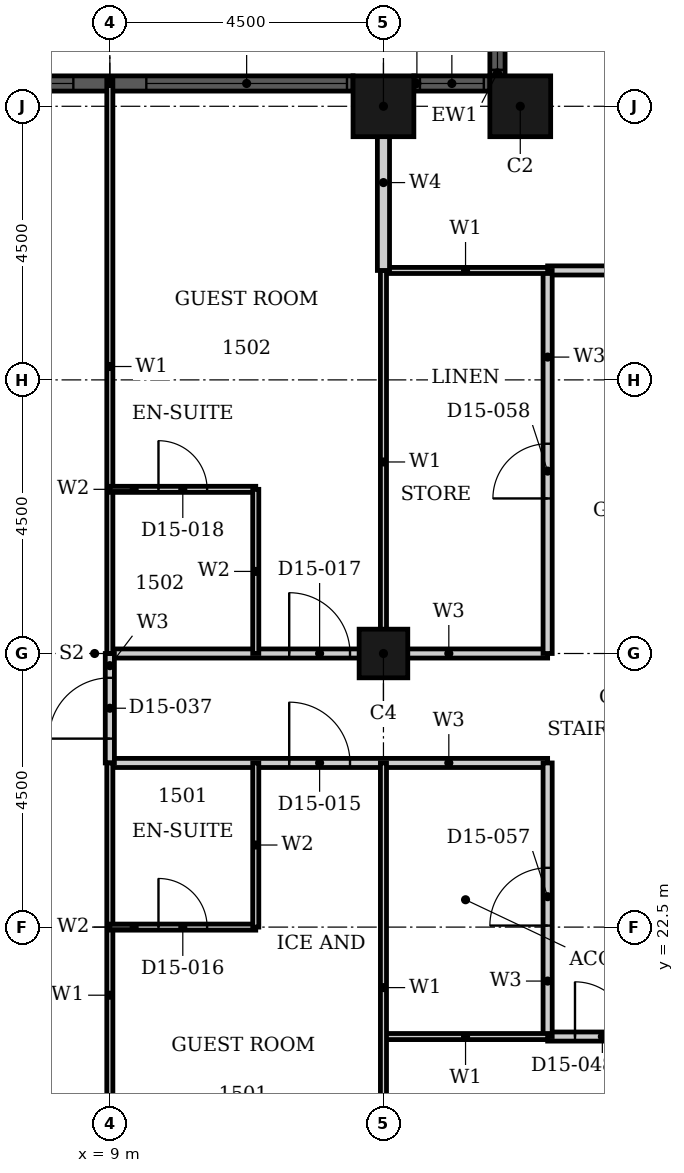
"""IFC4 building model, lengths in metres.
Left out: names, types, materials, properties, quantities, classifications, styles, units other than length and angle.
Written with IfcOpenShell. Run it as: python <this file> out.ifc"""

import sys

from ifc_helpers import new_model, si_unit, direction, frame, frame_2d, origin, origin_2d, place, context, subcontext, project, spatial, rectangle, hollow_rectangle, extrude, element, fill, save


model = new_model("IFC4")
c1 = context("Model", 3, precision=1e-05, world=origin(), true_north=direction((0.0, 1.0)))
c2 = subcontext(c1, "Body", "Model", "MODEL_VIEW")
j1 = project(units=[si_unit("LENGTHUNIT", "METRE"), si_unit("PLANEANGLEUNIT", "RADIAN")], contexts=[c1])
p1 = place(None, origin())
s1 = spatial("IfcSite", under=j1, at=p1, CompositionType="ELEMENT")
p2 = place(p1, origin())
s2 = spatial("IfcBuilding", under=s1, at=p2, CompositionType="ELEMENT")
p3 = place(p2, frame((0.0, 0.0, 67.2)))
s3 = spatial("IfcBuildingStorey", under=s2, at=p3, CompositionType="ELEMENT", Elevation=67.2)
for number, where, z_axis, x_axis in (
    (1, (15.75, 36.0, 0.0), (0.0, 0.0, 1.0), (1.0, 0.0, 0.0)),
    (2, (13.5, 36.0, 0.0), (0.0, 0.0, 1.0), (1.0, 0.0, 0.0)),
):
    element("IfcColumn", number, at=place(p3, frame(where, z_axis=z_axis, x_axis=x_axis)), inside=s3, PredefinedType="COLUMN", context=c2, shape_type="SweptSolid", body=[
        extrude(hollow_rectangle(XDim=1.0, YDim=1.0, WallThickness=0.032, at=origin_2d()), origin(), (0.0, 0.0, 1.0), 3.6),
    ])
p4 = place(p3, frame((13.5, 27.0, 0.0), z_axis=(0.0, 0.0, 1.0), x_axis=(1.0, 0.0, 0.0)))
e3 = element("IfcColumn", 3, at=p4, inside=s3, PredefinedType="COLUMN", context=c2, shape_type="SweptSolid", body=[
    extrude(hollow_rectangle(XDim=0.8, YDim=0.8, WallThickness=0.025, at=origin_2d()), origin(), (0.0, 0.0, 1.0), 3.6),
])
p5 = place(p3, frame((15.375, 37.75, 0.0), z_axis=(0.0, 0.0, 1.0), x_axis=(0.0, -1.0, 0.0)))
e4 = element("IfcWall", 4, at=p5, inside=s3, PredefinedType="SOLIDWALL", context=c2, shape_type="SweptSolid", body=[
    extrude(rectangle(XDim=1.25, YDim=0.25, at=frame_2d((0.625, 0.0))), origin(), (0.0, 0.0, 1.0), 3.6),
])
p6 = place(p5, frame((0.1, 0.0, 0.9)))
e5 = element("IfcOpeningElement", 5, at=p6, cuts=e4, PredefinedType="OPENING", context=c2, shape_type="SweptSolid", body=[
    extrude(rectangle(XDim=1.05, YDim=2.08, at=frame_2d((0.525, 1.04))), frame((0.0, 0.135, 0.0), z_axis=(0.0, -1.0, 0.0), x_axis=(1.0, 0.0, 0.0)), (0.0, 0.0, 1.0), 0.27),
])
p7 = place(p3, frame((15.25, 36.375, 0.0), z_axis=(0.0, 0.0, 1.0), x_axis=(-1.0, 0.0, 0.0)))
e6 = element("IfcWall", 6, at=p7, inside=s3, PredefinedType="SOLIDWALL", context=c2, shape_type="SweptSolid", body=[
    extrude(rectangle(XDim=1.25, YDim=0.25, at=frame_2d((0.625, 0.0))), origin(), (0.0, 0.0, 1.0), 3.6),
])
p8 = place(p7, frame((0.1, 0.0, 0.9)))
e7 = element("IfcOpeningElement", 7, at=p8, cuts=e6, PredefinedType="OPENING", context=c2, shape_type="SweptSolid", body=[
    extrude(rectangle(XDim=1.05, YDim=2.08, at=frame_2d((0.525, 1.04))), frame((0.0, 0.135, 0.0), z_axis=(0.0, -1.0, 0.0), x_axis=(1.0, 0.0, 0.0)), (0.0, 0.0, 1.0), 0.27),
])
p9 = place(p3, frame((13.0, 36.375, 0.0), z_axis=(0.0, 0.0, 1.0), x_axis=(-1.0, 0.0, 0.0)))
e8 = element("IfcWall", 8, at=p9, inside=s3, PredefinedType="SOLIDWALL", context=c2, shape_type="SweptSolid", body=[
    extrude(rectangle(XDim=8.0, YDim=0.25, at=frame_2d((4.0, 0.0))), origin(), (0.0, 0.0, 1.0), 3.6),
])
p10 = place(p9, frame((0.1, 0.0, 0.9)))
e9 = element("IfcOpeningElement", 9, at=p10, cuts=e8, PredefinedType="OPENING", context=c2, shape_type="SweptSolid", body=[
    extrude(rectangle(XDim=3.3, YDim=2.08, at=frame_2d((1.65, 1.04))), frame((0.0, 0.135, 0.0), z_axis=(0.0, -1.0, 0.0), x_axis=(1.0, 0.0, 0.0)), (0.0, 0.0, 1.0), 0.27),
])
p11 = place(p9, frame((4.6, 0.0, 0.9)))
e10 = element("IfcOpeningElement", 10, at=p11, cuts=e8, PredefinedType="OPENING", context=c2, shape_type="SweptSolid", body=[
    extrude(rectangle(XDim=3.3, YDim=2.08, at=frame_2d((1.65, 1.04))), frame((0.0, 0.135, 0.0), z_axis=(0.0, -1.0, 0.0), x_axis=(1.0, 0.0, 0.0)), (0.0, 0.0, 1.0), 0.27),
])
p12 = place(p3, frame((16.2, 20.7, 0.0), z_axis=(0.0, 0.0, 1.0), x_axis=(1.0, 0.0, 0.0)))
e11 = element("IfcWall", 11, at=p12, inside=s3, PredefinedType="PARTITIONING", context=c2, shape_type="SweptSolid", body=[
    extrude(rectangle(XDim=13.5, YDim=0.15, at=frame_2d((6.75, 0.0))), origin(), (0.0, 0.0, 1.0), 3.3),
])
p13 = place(p12, frame((4.75, 0.0, 0.0)))
e12 = element("IfcOpeningElement", 12, at=p13, cuts=e11, PredefinedType="OPENING", context=c2, shape_type="SweptSolid", body=[
    extrude(rectangle(XDim=1.0, YDim=2.1, at=frame_2d((0.5, 1.05))), frame((0.0, 0.085, 0.0), z_axis=(0.0, -1.0, 0.0), x_axis=(1.0, 0.0, 0.0)), (0.0, 0.0, 1.0), 0.17),
])
p14 = place(p12, frame((0.45, 0.0, 0.0)))
e13 = element("IfcOpeningElement", 13, at=p14, cuts=e11, PredefinedType="OPENING", context=c2, shape_type="SweptSolid", body=[
    extrude(rectangle(XDim=0.9, YDim=2.1, at=frame_2d((0.45, 1.05))), frame((0.0, 0.085, 0.0), z_axis=(0.0, -1.0, 0.0), x_axis=(1.0, 0.0, 0.0)), (0.0, 0.0, 1.0), 0.17),
])
p15 = place(p12, frame((7.35, 0.0, 0.0)))
e14 = element("IfcOpeningElement", 14, at=p15, cuts=e11, PredefinedType="OPENING", context=c2, shape_type="SweptSolid", body=[
    extrude(rectangle(XDim=0.9, YDim=2.1, at=frame_2d((0.45, 1.05))), frame((0.0, 0.085, 0.0), z_axis=(0.0, -1.0, 0.0), x_axis=(1.0, 0.0, 0.0)), (0.0, 0.0, 1.0), 0.17),
])
p16 = place(p12, frame((10.95, 0.0, 0.0)))
e15 = element("IfcOpeningElement", 15, at=p16, cuts=e11, PredefinedType="OPENING", context=c2, shape_type="SweptSolid", body=[
    extrude(rectangle(XDim=0.9, YDim=2.1, at=frame_2d((0.45, 1.05))), frame((0.0, 0.085, 0.0), z_axis=(0.0, -1.0, 0.0), x_axis=(1.0, 0.0, 0.0)), (0.0, 0.0, 1.0), 0.17),
])
p17 = place(p3, frame((9.0, 25.2, 0.0), z_axis=(0.0, 0.0, 1.0), x_axis=(1.0, 0.0, 0.0)))
e16 = element("IfcWall", 16, at=p17, inside=s3, PredefinedType="PARTITIONING", context=c2, shape_type="SweptSolid", body=[
    extrude(rectangle(XDim=7.2, YDim=0.15, at=frame_2d((3.6, 0.0))), origin(), (0.0, 0.0, 1.0), 3.3),
])
p18 = place(p17, frame((2.95, 0.0, 0.0)))
e17 = element("IfcOpeningElement", 17, at=p18, cuts=e16, PredefinedType="OPENING", context=c2, shape_type="SweptSolid", body=[
    extrude(rectangle(XDim=1.0, YDim=2.1, at=frame_2d((0.5, 1.05))), frame((0.0, 0.085, 0.0), z_axis=(0.0, -1.0, 0.0), x_axis=(1.0, 0.0, 0.0)), (0.0, 0.0, 1.0), 0.17),
])
p19 = place(p3, frame((9.0, 27.0, 0.0), z_axis=(0.0, 0.0, 1.0), x_axis=(1.0, 0.0, 0.0)))
e18 = element("IfcWall", 18, at=p19, inside=s3, PredefinedType="PARTITIONING", context=c2, shape_type="SweptSolid", body=[
    extrude(rectangle(XDim=7.2, YDim=0.15, at=frame_2d((3.6, 0.0))), origin(), (0.0, 0.0, 1.0), 2.58),
])
p20 = place(p19, frame((2.95, 0.0, 0.0)))
e19 = element("IfcOpeningElement", 19, at=p20, cuts=e18, PredefinedType="OPENING", context=c2, shape_type="SweptSolid", body=[
    extrude(rectangle(XDim=1.0, YDim=2.1, at=frame_2d((0.5, 1.05))), frame((0.0, 0.085, 0.0), z_axis=(0.0, -1.0, 0.0), x_axis=(1.0, 0.0, 0.0)), (0.0, 0.0, 1.0), 0.17),
])
p21 = place(p3, frame((16.2, 33.3, 0.0), z_axis=(0.0, 0.0, 1.0), x_axis=(1.0, 0.0, 0.0)))
e20 = element("IfcWall", 20, at=p21, inside=s3, PredefinedType="PARTITIONING", context=c2, shape_type="SweptSolid", body=[
    extrude(rectangle(XDim=9.9, YDim=0.15, at=frame_2d((4.95, 0.0))), origin(), (0.0, 0.0, 1.0), 3.3),
])
p22 = place(p21, frame((4.75, 0.0, 0.0)))
e21 = element("IfcOpeningElement", 21, at=p22, cuts=e20, PredefinedType="OPENING", context=c2, shape_type="SweptSolid", body=[
    extrude(rectangle(XDim=1.0, YDim=2.1, at=frame_2d((0.5, 1.05))), frame((0.0, 0.085, 0.0), z_axis=(0.0, -1.0, 0.0), x_axis=(1.0, 0.0, 0.0)), (0.0, 0.0, 1.0), 0.17),
])
p23 = place(p21, frame((7.65, 0.0, 0.0)))
e22 = element("IfcOpeningElement", 22, at=p23, cuts=e20, PredefinedType="OPENING", context=c2, shape_type="SweptSolid", body=[
    extrude(rectangle(XDim=0.9, YDim=2.1, at=frame_2d((0.45, 1.05))), frame((0.0, 0.085, 0.0), z_axis=(0.0, -1.0, 0.0), x_axis=(1.0, 0.0, 0.0)), (0.0, 0.0, 1.0), 0.17),
])
p24 = place(p3, frame((16.2, 27.0, 0.0), z_axis=(0.0, 0.0, 1.0), x_axis=(0.0, 1.0, 0.0)))
e23 = element("IfcWall", 23, at=p24, inside=s3, PredefinedType="PARTITIONING", context=c2, shape_type="SweptSolid", body=[
    extrude(rectangle(XDim=6.3, YDim=0.15, at=frame_2d((3.15, 0.0))), origin(), (0.0, 0.0, 1.0), 3.3),
])
p25 = place(p24, frame((2.55, 0.0, 0.0)))
e24 = element("IfcOpeningElement", 24, at=p25, cuts=e23, PredefinedType="OPENING", context=c2, shape_type="SweptSolid", body=[
    extrude(rectangle(XDim=0.9, YDim=2.1, at=frame_2d((0.45, 1.05))), frame((0.0, 0.085, 0.0), z_axis=(0.0, -1.0, 0.0), x_axis=(1.0, 0.0, 0.0)), (0.0, 0.0, 1.0), 0.17),
])
p26 = place(p3, frame((16.2, 20.7, 0.0), z_axis=(0.0, 0.0, 1.0), x_axis=(0.0, 1.0, 0.0)))
e25 = element("IfcWall", 25, at=p26, inside=s3, PredefinedType="PARTITIONING", context=c2, shape_type="SweptSolid", body=[
    extrude(rectangle(XDim=4.5, YDim=0.15, at=frame_2d((2.25, 0.0))), origin(), (0.0, 0.0, 1.0), 3.3),
])
p27 = place(p26, frame((1.825, 0.0, 0.0)))
e26 = element("IfcOpeningElement", 26, at=p27, cuts=e25, PredefinedType="OPENING", context=c2, shape_type="SweptSolid", body=[
    extrude(rectangle(XDim=0.95, YDim=2.1, at=frame_2d((0.475, 1.05))), frame((0.0, 0.085, 0.0), z_axis=(0.0, -1.0, 0.0), x_axis=(1.0, 0.0, 0.0)), (0.0, 0.0, 1.0), 0.17),
])
p28 = place(p3, frame((9.0, 25.2, 0.0), z_axis=(0.0, 0.0, 1.0), x_axis=(0.0, 1.0, 0.0)))
e27 = element("IfcWall", 27, at=p28, inside=s3, PredefinedType="PARTITIONING", context=c2, shape_type="SweptSolid", body=[
    extrude(rectangle(XDim=1.8, YDim=0.15, at=frame_2d((0.9, 0.0))), origin(), (0.0, 0.0, 1.0), 3.3),
])
p29 = place(p28, frame((0.4, 0.0, 0.0)))
e28 = element("IfcOpeningElement", 28, at=p29, cuts=e27, PredefinedType="OPENING", context=c2, shape_type="SweptSolid", body=[
    extrude(rectangle(XDim=1.0, YDim=2.1, at=frame_2d((0.5, 1.05))), frame((0.0, 0.085, 0.0), z_axis=(0.0, -1.0, 0.0), x_axis=(1.0, 0.0, 0.0)), (0.0, 0.0, 1.0), 0.17),
])
for number, where, z_axis, x_axis in (
    (29, (13.5, 20.7, 0.0), (0.0, 0.0, 1.0), (1.0, 0.0, 0.0)),
    (30, (13.5, 33.3, 0.0), (0.0, 0.0, 1.0), (1.0, 0.0, 0.0)),
):
    element("IfcWall", number, at=place(p3, frame(where, z_axis=z_axis, x_axis=x_axis)), inside=s3, PredefinedType="PARTITIONING", context=c2, shape_type="SweptSolid", body=[
        extrude(rectangle(XDim=2.7, YDim=0.1, at=frame_2d((1.35, 0.0))), origin(), (0.0, 0.0, 1.0), 3.3),
    ])
p30 = place(p3, frame((13.5, 27.0, 0.0), z_axis=(0.0, 0.0, 1.0), x_axis=(0.0, 1.0, 0.0)))
e31 = element("IfcWall", 31, at=p30, inside=s3, PredefinedType="PARTITIONING", context=c2, shape_type="SweptSolid", body=[
    extrude(rectangle(XDim=6.3, YDim=0.1, at=frame_2d((3.15, 0.0))), origin(), (0.0, 0.0, 1.0), 2.38),
])
p31 = place(p3, frame((13.5, 17.81, 0.0), z_axis=(0.0, 0.0, 1.0), x_axis=(0.0, 1.0, 0.0)))
e32 = element("IfcWall", 32, at=p31, inside=s3, PredefinedType="PARTITIONING", context=c2, shape_type="SweptSolid", body=[
    extrude(rectangle(XDim=7.39, YDim=0.1, at=frame_2d((3.695, 0.0))), origin(), (0.0, 0.0, 1.0), 2.38),
])
p32 = place(p3, frame((9.0, 27.0, 0.0), z_axis=(0.0, 0.0, 1.0), x_axis=(0.0, 1.0, 0.0)))
e33 = element("IfcWall", 33, at=p32, inside=s3, PredefinedType="PARTITIONING", context=c2, shape_type="SweptSolid", body=[
    extrude(rectangle(XDim=9.44, YDim=0.1, at=frame_2d((4.72, 0.0))), origin(), (0.0, 0.0, 1.0), 3.3),
])
p33 = place(p3, frame((9.0, 17.56, 0.0), z_axis=(0.0, 0.0, 1.0), x_axis=(0.0, 1.0, 0.0)))
e34 = element("IfcWall", 34, at=p33, inside=s3, PredefinedType="PARTITIONING", context=c2, shape_type="SweptSolid", body=[
    extrude(rectangle(XDim=7.64, YDim=0.1, at=frame_2d((3.82, 0.0))), origin(), (0.0, 0.0, 1.0), 3.3),
])
p34 = place(p3, frame((13.5, 33.3, 0.0), z_axis=(0.0, 0.0, 1.0), x_axis=(0.0, 1.0, 0.0)))
e35 = element("IfcWall", 35, at=p34, inside=s3, PredefinedType="PARTITIONING", context=c2, shape_type="SweptSolid", body=[
    extrude(rectangle(XDim=2.89, YDim=0.2, at=frame_2d((1.445, 0.0))), origin(), (0.0, 0.0, 1.0), 2.38),
])
p35 = place(p3, frame((9.0, 22.5, 0.0), z_axis=(0.0, 0.0, 1.0), x_axis=(1.0, 0.0, 0.0)))
e36 = element("IfcWall", 36, at=p35, inside=s3, PredefinedType="PARTITIONING", context=c2, shape_type="SweptSolid", body=[
    extrude(rectangle(XDim=2.4, YDim=0.1, at=frame_2d((1.2, 0.0))), origin(), (0.0, 0.0, 1.0), 2.58),
])
p36 = place(p35, frame((0.8, 0.0, 0.0)))
e37 = element("IfcOpeningElement", 37, at=p36, cuts=e36, PredefinedType="OPENING", context=c2, shape_type="SweptSolid", body=[
    extrude(rectangle(XDim=0.8, YDim=2.1, at=frame_2d((0.4, 1.05))), frame((0.0, 0.06, 0.0), z_axis=(0.0, -1.0, 0.0), x_axis=(1.0, 0.0, 0.0)), (0.0, 0.0, 1.0), 0.12),
])
p37 = place(p3, frame((9.0, 29.7, 0.0), z_axis=(0.0, 0.0, 1.0), x_axis=(1.0, 0.0, 0.0)))
e38 = element("IfcWall", 38, at=p37, inside=s3, PredefinedType="PARTITIONING", context=c2, shape_type="SweptSolid", body=[
    extrude(rectangle(XDim=2.4, YDim=0.1, at=frame_2d((1.2, 0.0))), origin(), (0.0, 0.0, 1.0), 3.3),
])
p38 = place(p37, frame((0.8, 0.0, 0.0)))
e39 = element("IfcOpeningElement", 39, at=p38, cuts=e38, PredefinedType="OPENING", context=c2, shape_type="SweptSolid", body=[
    extrude(rectangle(XDim=0.8, YDim=2.1, at=frame_2d((0.4, 1.05))), frame((0.0, 0.06, 0.0), z_axis=(0.0, -1.0, 0.0), x_axis=(1.0, 0.0, 0.0)), (0.0, 0.0, 1.0), 0.12),
])
for number, where, z_axis, x_axis in (
    (40, (11.4, 27.0, 0.0), (0.0, 0.0, 1.0), (0.0, 1.0, 0.0)),
    (41, (11.4, 22.5, 0.0), (0.0, 0.0, 1.0), (0.0, 1.0, 0.0)),
):
    element("IfcWall", number, at=place(p3, frame(where, z_axis=z_axis, x_axis=x_axis)), inside=s3, PredefinedType="PARTITIONING", context=c2, shape_type="SweptSolid", body=[
        extrude(rectangle(XDim=2.7, YDim=0.1, at=frame_2d((1.35, 0.0))), origin(), (0.0, 0.0, 1.0), 3.3),
    ])
p39 = place(p6, origin())
e42 = element("IfcWindow", 42, at=p39, inside=s3, PartitioningType="SINGLE_PANEL", PredefinedType="WINDOW", context=c2, shape_type="SweptSolid", body=[
    extrude(rectangle(XDim=1.05, YDim=2.08, at=frame_2d((0.525, 1.04))), frame((0.0, 0.03, 0.0), z_axis=(0.0, -1.0, 0.0), x_axis=(1.0, 0.0, 0.0)), (0.0, 0.0, 1.0), 0.06),
])
fill(e5, e42)
p40 = place(p8, origin())
e43 = element("IfcWindow", 43, at=p40, inside=s3, PartitioningType="SINGLE_PANEL", PredefinedType="WINDOW", context=c2, shape_type="SweptSolid", body=[
    extrude(rectangle(XDim=1.05, YDim=2.08, at=frame_2d((0.525, 1.04))), frame((0.0, 0.03, 0.0), z_axis=(0.0, -1.0, 0.0), x_axis=(1.0, 0.0, 0.0)), (0.0, 0.0, 1.0), 0.06),
])
fill(e7, e43)
p41 = place(p10, origin())
e44 = element("IfcWindow", 44, at=p41, inside=s3, PartitioningType="SINGLE_PANEL", PredefinedType="WINDOW", context=c2, shape_type="SweptSolid", body=[
    extrude(rectangle(XDim=3.3, YDim=2.08, at=frame_2d((1.65, 1.04))), frame((0.0, 0.03, 0.0), z_axis=(0.0, -1.0, 0.0), x_axis=(1.0, 0.0, 0.0)), (0.0, 0.0, 1.0), 0.06),
])
fill(e9, e44)
p42 = place(p11, origin())
e45 = element("IfcWindow", 45, at=p42, inside=s3, PartitioningType="SINGLE_PANEL", PredefinedType="WINDOW", context=c2, shape_type="SweptSolid", body=[
    extrude(rectangle(XDim=3.3, YDim=2.08, at=frame_2d((1.65, 1.04))), frame((0.0, 0.03, 0.0), z_axis=(0.0, -1.0, 0.0), x_axis=(1.0, 0.0, 0.0)), (0.0, 0.0, 1.0), 0.06),
])
fill(e10, e45)
p43 = place(p18, origin())
e46 = element("IfcDoor", 46, at=p43, inside=s3, OperationType="SINGLE_SWING_RIGHT", PredefinedType="DOOR", context=c2, shape_type="SweptSolid", body=[
    extrude(rectangle(XDim=1.0, YDim=2.1, at=frame_2d((0.5, 1.05))), frame((0.0, 0.025, 0.0), z_axis=(0.0, -1.0, 0.0), x_axis=(1.0, 0.0, 0.0)), (0.0, 0.0, 1.0), 0.05),
])
fill(e17, e46)
p44 = place(p36, origin())
e47 = element("IfcDoor", 47, at=p44, inside=s3, OperationType="SINGLE_SWING_LEFT", PredefinedType="DOOR", context=c2, shape_type="SweptSolid", body=[
    extrude(rectangle(XDim=0.8, YDim=2.1, at=frame_2d((0.4, 1.05))), frame((0.0, 0.025, 0.0), z_axis=(0.0, -1.0, 0.0), x_axis=(1.0, 0.0, 0.0)), (0.0, 0.0, 1.0), 0.05),
])
fill(e37, e47)
p45 = place(p20, origin())
e48 = element("IfcDoor", 48, at=p45, inside=s3, OperationType="SINGLE_SWING_RIGHT", PredefinedType="DOOR", context=c2, shape_type="SweptSolid", body=[
    extrude(rectangle(XDim=1.0, YDim=2.1, at=frame_2d((0.5, 1.05))), frame((0.0, 0.025, 0.0), z_axis=(0.0, -1.0, 0.0), x_axis=(1.0, 0.0, 0.0)), (0.0, 0.0, 1.0), 0.05),
])
fill(e19, e48)
p46 = place(p38, origin())
e49 = element("IfcDoor", 49, at=p46, inside=s3, OperationType="SINGLE_SWING_LEFT", PredefinedType="DOOR", context=c2, shape_type="SweptSolid", body=[
    extrude(rectangle(XDim=0.8, YDim=2.1, at=frame_2d((0.4, 1.05))), frame((0.0, 0.025, 0.0), z_axis=(0.0, -1.0, 0.0), x_axis=(1.0, 0.0, 0.0)), (0.0, 0.0, 1.0), 0.05),
])
fill(e39, e49)
p47 = place(p29, origin())
e50 = element("IfcDoor", 50, at=p47, inside=s3, OperationType="SINGLE_SWING_LEFT", PredefinedType="DOOR", context=c2, shape_type="SweptSolid", body=[
    extrude(rectangle(XDim=1.0, YDim=2.1, at=frame_2d((0.5, 1.05))), frame((0.0, 0.025, 0.0), z_axis=(0.0, -1.0, 0.0), x_axis=(1.0, 0.0, 0.0)), (0.0, 0.0, 1.0), 0.05),
])
fill(e28, e50)
p48 = place(p14, origin())
e51 = element("IfcDoor", 51, at=p48, inside=s3, OperationType="SINGLE_SWING_LEFT", PredefinedType="DOOR", context=c2, shape_type="SweptSolid", body=[
    extrude(rectangle(XDim=0.9, YDim=2.1, at=frame_2d((0.45, 1.05))), frame((0.0, 0.025, 0.0), z_axis=(0.0, -1.0, 0.0), x_axis=(1.0, 0.0, 0.0)), (0.0, 0.0, 1.0), 0.05),
])
fill(e13, e51)
p49 = place(p27, origin())
e52 = element("IfcDoor", 52, at=p49, inside=s3, OperationType="SINGLE_SWING_LEFT", PredefinedType="DOOR", context=c2, shape_type="SweptSolid", body=[
    extrude(rectangle(XDim=0.95, YDim=2.1, at=frame_2d((0.475, 1.05))), frame((0.0, 0.025, 0.0), z_axis=(0.0, -1.0, 0.0), x_axis=(1.0, 0.0, 0.0)), (0.0, 0.0, 1.0), 0.05),
])
fill(e26, e52)
p50 = place(p25, origin())
e53 = element("IfcDoor", 53, at=p50, inside=s3, OperationType="SINGLE_SWING_LEFT", PredefinedType="DOOR", context=c2, shape_type="SweptSolid", body=[
    extrude(rectangle(XDim=0.9, YDim=2.1, at=frame_2d((0.45, 1.05))), frame((0.0, 0.025, 0.0), z_axis=(0.0, -1.0, 0.0), x_axis=(1.0, 0.0, 0.0)), (0.0, 0.0, 1.0), 0.05),
])
fill(e24, e53)
save(model, sys.argv[1])
